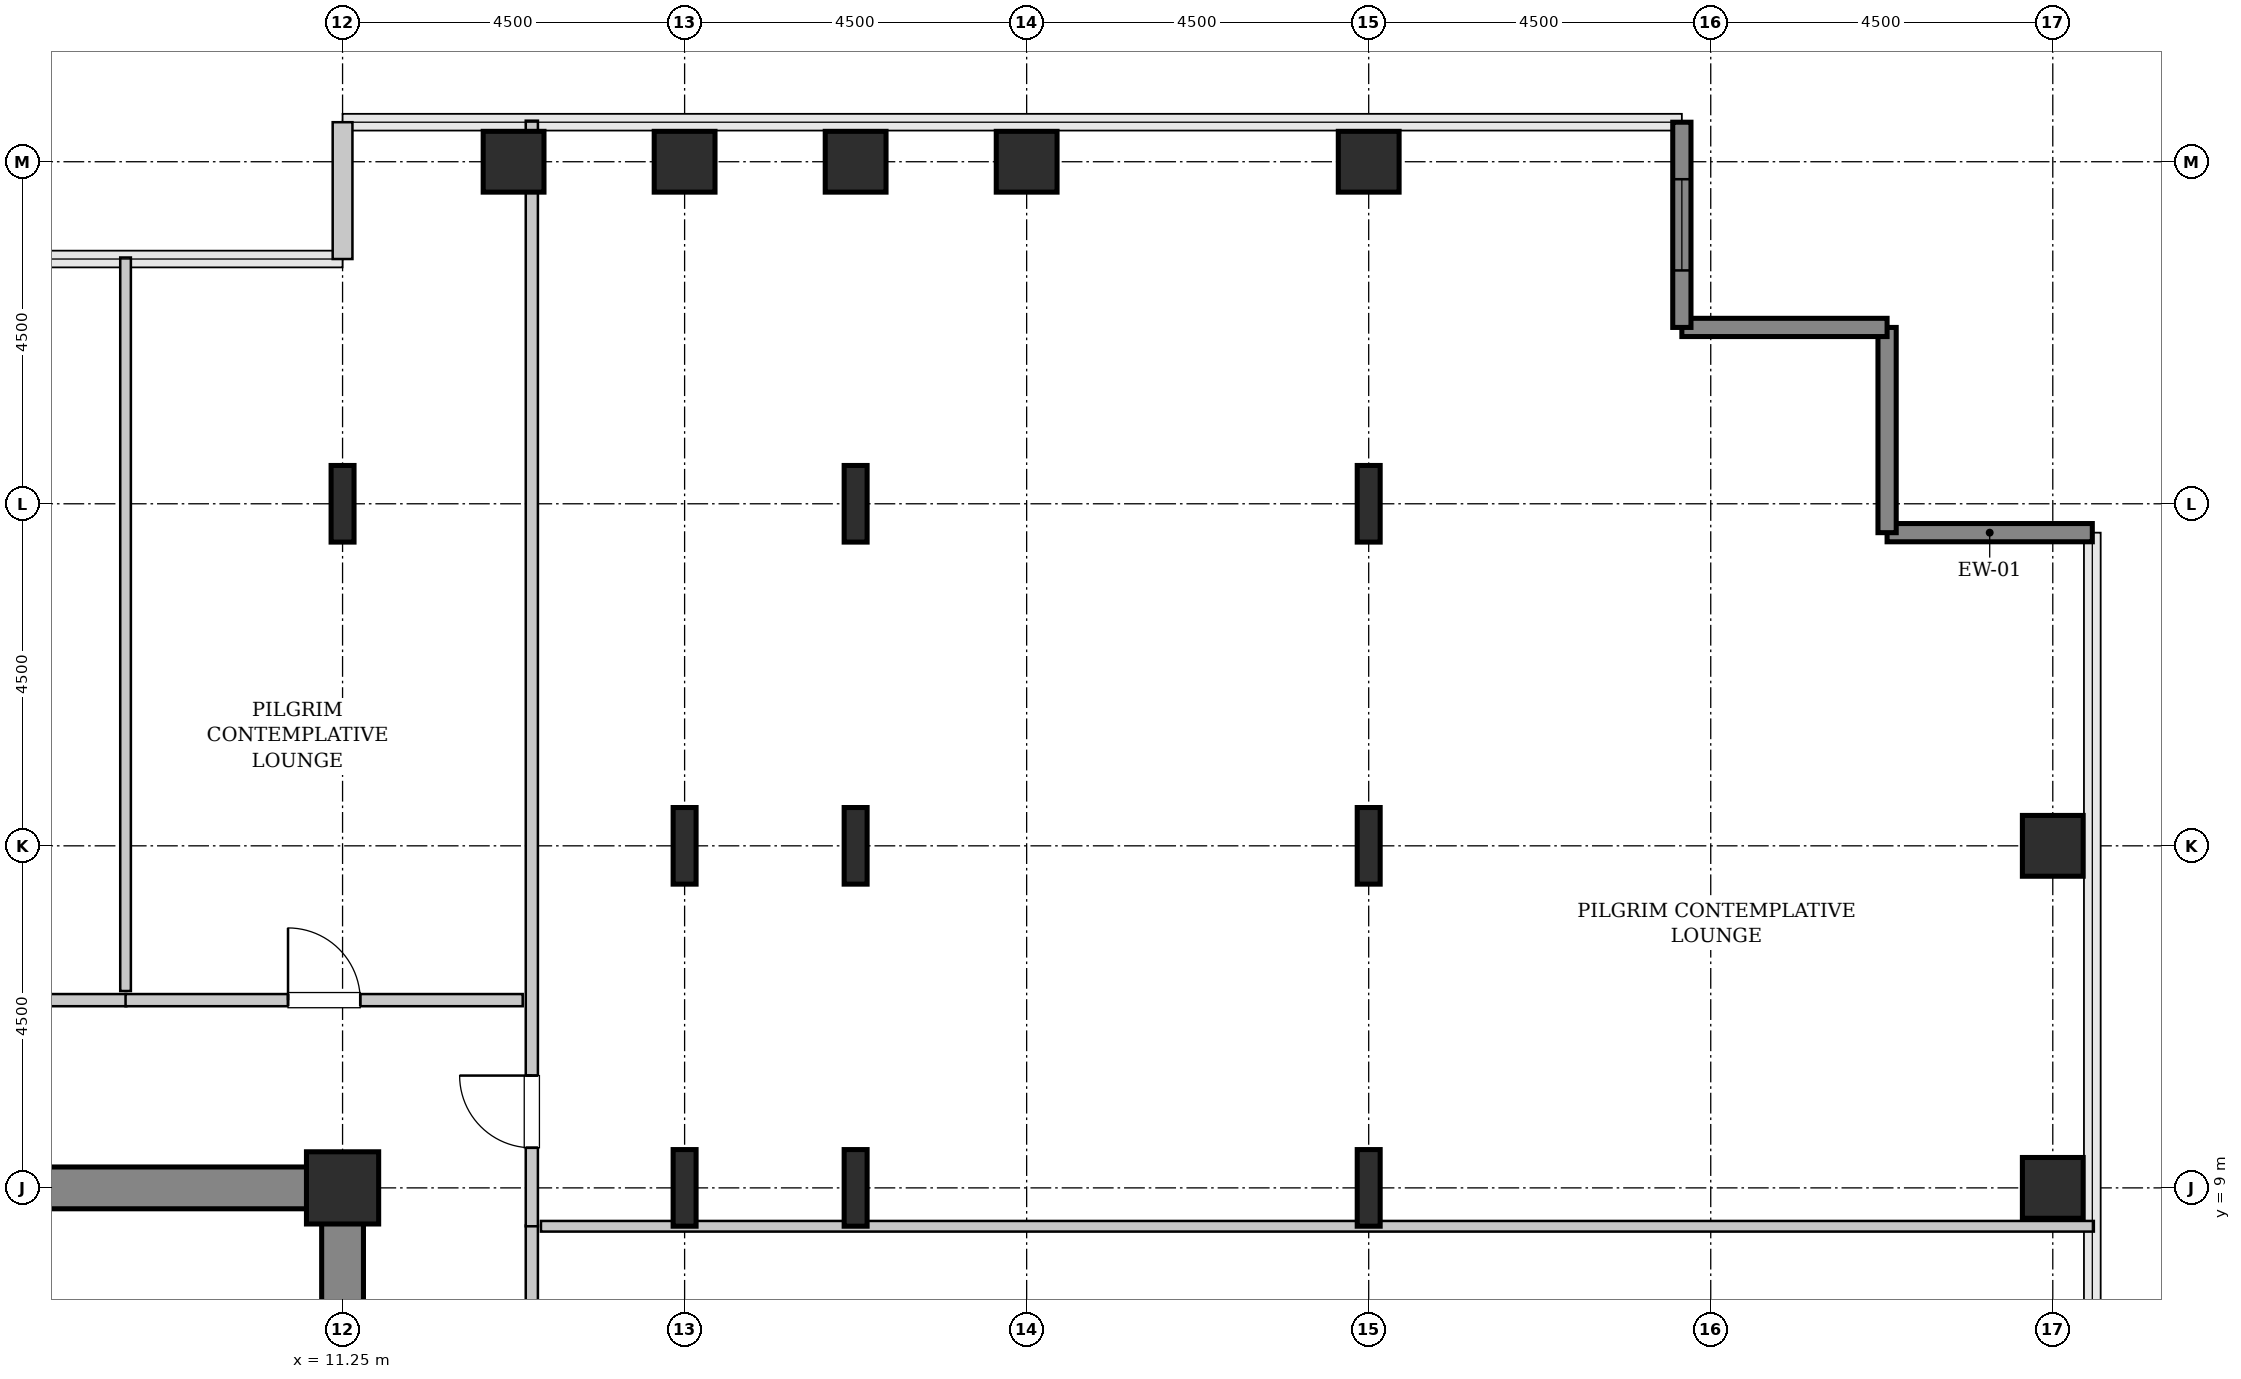
"""IFC4 building model, lengths in metres.
Left out: names, types, materials, properties, quantities, classifications, styles, units other than length and angle.
Written with IfcOpenShell. Run it as: python <this file> out.ifc"""

import sys

from ifc_helpers import new_model, si_unit, direction, frame, frame_2d, origin, origin_2d, place, context, subcontext, project, spatial, rectangle, hollow_rectangle, i_section, extrude, source, transform, mapped, element, fill, save


model = new_model("IFC4")
c1 = context("Model", 3, precision=1e-05, world=origin(), true_north=direction((0.0, 1.0)))
c2 = subcontext(c1, "Body", "Model", "MODEL_VIEW")
j1 = project(units=[si_unit("LENGTHUNIT", "METRE"), si_unit("PLANEANGLEUNIT", "RADIAN")], contexts=[c1])
p1 = place(None, origin())
s1 = spatial("IfcSite", under=j1, at=p1, CompositionType="ELEMENT")
p2 = place(p1, origin())
s2 = spatial("IfcBuilding", under=s1, at=p2, CompositionType="ELEMENT")
p3 = place(p2, frame((0.0, 0.0, 132.6)))
s3 = spatial("IfcBuildingStorey", under=s2, at=p3, CompositionType="ELEMENT", Elevation=132.6)
m1 = source(origin(), c2, "Body", "SweptSolid", [
    extrude(rectangle(XDim=9.975, YDim=0.55, at=frame_2d((4.987, 0.0))), origin(), (0.0, 0.0, 1.0), 3.8),
])
p4 = place(p3, frame((1.55, 9.0, 0.0), z_axis=(0.0, 0.0, 1.0), x_axis=(1.0, 0.0, 0.0)))
e1 = element("IfcWall", 1, at=p4, inside=s3, PredefinedType="SHEAR", context=c2, shape_type="MappedRepresentation", body=[
    mapped(m1, transform((0.0, 0.0, 0.0), x_axis=(1.0, 0.0, 0.0), y_axis=(0.0, 1.0, 0.0), z_axis=(0.0, 0.0, 1.0), scale=1.0)),
])
m2 = source(origin(), c2, "Body", "SweptSolid", [
    extrude(rectangle(XDim=7.375, YDim=0.55, at=frame_2d((3.688, 0.0))), origin(), (0.0, 0.0, 1.0), 3.8),
])
p5 = place(p3, frame((11.25, 1.35, 0.0), z_axis=(0.0, 0.0, 1.0), x_axis=(0.0, 1.0, 0.0)))
e2 = element("IfcWall", 2, at=p5, inside=s3, PredefinedType="SHEAR", context=c2, shape_type="MappedRepresentation", body=[
    mapped(m2, transform((0.0, 0.0, 0.0), x_axis=(1.0, 0.0, 0.0), y_axis=(0.0, 1.0, 0.0), z_axis=(0.0, 0.0, 1.0), scale=1.0)),
])
m3 = source(origin(), c2, "Body", "SweptSolid", [
    extrude(hollow_rectangle(XDim=0.95, YDim=0.95, WallThickness=0.045, InnerFilletRadius=0.045, OuterFilletRadius=0.09, at=origin_2d()), origin(), (0.0, 0.0, 1.0), 3.8),
])
p6 = place(p3, frame((11.25, 9.0, 0.0), z_axis=(0.0, 0.0, 1.0), x_axis=(1.0, 0.0, 0.0)))
e3 = element("IfcColumn", 3, at=p6, inside=s3, PredefinedType="COLUMN", context=c2, shape_type="MappedRepresentation", body=[
    mapped(m3, transform((0.0, 0.0, 0.0), x_axis=(1.0, 0.0, 0.0), y_axis=(0.0, 1.0, 0.0), z_axis=(0.0, 0.0, 1.0), scale=1.0)),
])
m4 = source(origin(), c2, "Body", "SweptSolid", [
    extrude(i_section(OverallWidth=0.302, OverallDepth=1.008, WebThickness=0.021, FlangeThickness=0.04, FilletRadius=0.03, at=origin_2d()), origin(), (0.0, 0.0, 1.0), 3.8),
])
p7 = place(p3, frame((11.25, 18.0, 0.0), z_axis=(0.0, 0.0, 1.0), x_axis=(1.0, 0.0, 0.0)))
e4 = element("IfcColumn", 4, at=p7, inside=s3, PredefinedType="COLUMN", context=c2, shape_type="MappedRepresentation", body=[
    mapped(m4, transform((0.0, 0.0, 0.0), x_axis=(1.0, 0.0, 0.0), y_axis=(0.0, 1.0, 0.0), z_axis=(0.0, 0.0, 1.0), scale=1.0)),
])
m5 = source(origin(), c2, "Body", "SweptSolid", [
    extrude(hollow_rectangle(XDim=0.8, YDim=0.8, WallThickness=0.04, InnerFilletRadius=0.04, OuterFilletRadius=0.08, at=origin_2d()), origin(), (0.0, 0.0, 1.0), 3.8),
])
p8 = place(p3, frame((13.5, 22.5, 0.0), z_axis=(0.0, 0.0, 1.0), x_axis=(1.0, 0.0, 0.0)))
e5 = element("IfcColumn", 5, at=p8, inside=s3, PredefinedType="COLUMN", context=c2, shape_type="MappedRepresentation", body=[
    mapped(m5, transform((0.0, 0.0, 0.0), x_axis=(1.0, 0.0, 0.0), y_axis=(0.0, 1.0, 0.0), z_axis=(0.0, 0.0, 1.0), scale=1.0)),
])
for number, where, z_axis, x_axis in (
    (6, (15.75, 9.0, 0.0), (0.0, 0.0, 1.0), (1.0, 0.0, 0.0)),
    (7, (15.75, 13.5, 0.0), (0.0, 0.0, 1.0), (1.0, 0.0, 0.0)),
):
    element("IfcColumn", number, at=place(p3, frame(where, z_axis=z_axis, x_axis=x_axis)), inside=s3, PredefinedType="COLUMN", context=c2, shape_type="MappedRepresentation", body=[
        mapped(m4, transform((0.0, 0.0, 0.0), x_axis=(1.0, 0.0, 0.0), y_axis=(0.0, 1.0, 0.0), z_axis=(0.0, 0.0, 1.0), scale=1.0)),
    ])
p9 = place(p3, frame((15.75, 22.5, 0.0), z_axis=(0.0, 0.0, 1.0), x_axis=(1.0, 0.0, 0.0)))
e8 = element("IfcColumn", 8, at=p9, inside=s3, PredefinedType="COLUMN", context=c2, shape_type="MappedRepresentation", body=[
    mapped(m5, transform((0.0, 0.0, 0.0), x_axis=(1.0, 0.0, 0.0), y_axis=(0.0, 1.0, 0.0), z_axis=(0.0, 0.0, 1.0), scale=1.0)),
])
for number, where, z_axis, x_axis in (
    (9, (18.0, 9.0, 0.0), (0.0, 0.0, 1.0), (1.0, 0.0, 0.0)),
    (10, (18.0, 13.5, 0.0), (0.0, 0.0, 1.0), (1.0, 0.0, 0.0)),
    (11, (18.0, 18.0, 0.0), (0.0, 0.0, 1.0), (1.0, 0.0, 0.0)),
):
    element("IfcColumn", number, at=place(p3, frame(where, z_axis=z_axis, x_axis=x_axis)), inside=s3, PredefinedType="COLUMN", context=c2, shape_type="MappedRepresentation", body=[
        mapped(m4, transform((0.0, 0.0, 0.0), x_axis=(1.0, 0.0, 0.0), y_axis=(0.0, 1.0, 0.0), z_axis=(0.0, 0.0, 1.0), scale=1.0)),
    ])
for number, where, z_axis, x_axis in (
    (12, (18.0, 22.5, 0.0), (0.0, 0.0, 1.0), (1.0, 0.0, 0.0)),
    (13, (20.25, 22.5, 0.0), (0.0, 0.0, 1.0), (1.0, 0.0, 0.0)),
):
    element("IfcColumn", number, at=place(p3, frame(where, z_axis=z_axis, x_axis=x_axis)), inside=s3, PredefinedType="COLUMN", context=c2, shape_type="MappedRepresentation", body=[
        mapped(m5, transform((0.0, 0.0, 0.0), x_axis=(1.0, 0.0, 0.0), y_axis=(0.0, 1.0, 0.0), z_axis=(0.0, 0.0, 1.0), scale=1.0)),
    ])
for number, where, z_axis, x_axis in (
    (14, (24.75, 9.0, 0.0), (0.0, 0.0, 1.0), (1.0, 0.0, 0.0)),
    (15, (24.75, 13.5, 0.0), (0.0, 0.0, 1.0), (1.0, 0.0, 0.0)),
    (16, (24.75, 18.0, 0.0), (0.0, 0.0, 1.0), (1.0, 0.0, 0.0)),
):
    element("IfcColumn", number, at=place(p3, frame(where, z_axis=z_axis, x_axis=x_axis)), inside=s3, PredefinedType="COLUMN", context=c2, shape_type="MappedRepresentation", body=[
        mapped(m4, transform((0.0, 0.0, 0.0), x_axis=(1.0, 0.0, 0.0), y_axis=(0.0, 1.0, 0.0), z_axis=(0.0, 0.0, 1.0), scale=1.0)),
    ])
for number, where, z_axis, x_axis in (
    (17, (24.75, 22.5, 0.0), (0.0, 0.0, 1.0), (1.0, 0.0, 0.0)),
    (18, (33.75, 9.0, 0.0), (0.0, 0.0, 1.0), (1.0, 0.0, 0.0)),
    (19, (33.75, 13.5, 0.0), (0.0, 0.0, 1.0), (1.0, 0.0, 0.0)),
):
    element("IfcColumn", number, at=place(p3, frame(where, z_axis=z_axis, x_axis=x_axis)), inside=s3, PredefinedType="COLUMN", context=c2, shape_type="MappedRepresentation", body=[
        mapped(m5, transform((0.0, 0.0, 0.0), x_axis=(1.0, 0.0, 0.0), y_axis=(0.0, 1.0, 0.0), z_axis=(0.0, 0.0, 1.0), scale=1.0)),
    ])
m6 = source(origin(), c2, "Body", "SweptSolid", [
    extrude(rectangle(XDim=2.7, YDim=0.24, at=frame_2d((1.35, 0.0))), origin(), (0.0, 0.0, 1.0), 3.55),
])
for number, where, z_axis, x_axis in (
    (20, (34.27, 17.62, 0.0), (0.0, 0.0, 1.0), (-1.0, 0.0, 0.0)),
    (21, (31.57, 17.62, 0.0), (0.0, 0.0, 1.0), (0.0, 1.0, 0.0)),
    (22, (31.57, 20.32, 0.0), (0.0, 0.0, 1.0), (-1.0, 0.0, 0.0)),
):
    element("IfcWall", number, at=place(p3, frame(where, z_axis=z_axis, x_axis=x_axis)), inside=s3, PredefinedType="SHEAR", context=c2, shape_type="MappedRepresentation", body=[
        mapped(m6, transform((0.0, 0.0, 0.0), x_axis=(1.0, 0.0, 0.0), y_axis=(0.0, 1.0, 0.0), z_axis=(0.0, 0.0, 1.0), scale=1.0)),
    ])
p10 = place(p3, frame((28.87, 20.32, 0.0), z_axis=(0.0, 0.0, 1.0), x_axis=(0.0, 1.0, 0.0)))
e23 = element("IfcWall", 23, at=p10, inside=s3, PredefinedType="SHEAR", context=c2, shape_type="MappedRepresentation", body=[
    mapped(m6, transform((0.0, 0.0, 0.0), x_axis=(1.0, 0.0, 0.0), y_axis=(0.0, 1.0, 0.0), z_axis=(0.0, 0.0, 1.0), scale=1.0)),
])
p11 = place(p10, frame((0.75, 0.0, 0.85)))
e24 = element("IfcOpeningElement", 24, at=p11, cuts=e23, PredefinedType="OPENING", context=c2, shape_type="SweptSolid", body=[
    extrude(rectangle(XDim=1.2, YDim=1.8, at=frame_2d((0.6, 0.9))), frame((0.0, 0.13, 0.0), z_axis=(0.0, -1.0, 0.0), x_axis=(1.0, 0.0, 0.0)), (0.0, 0.0, 1.0), 0.26),
])
m7 = source(origin(), c2, "Body", "SweptSolid", [
    extrude(rectangle(XDim=1.8, YDim=0.26, at=frame_2d((0.9, 0.0))), origin(), (0.0, 0.0, 1.0), 3.55),
])
p12 = place(p3, frame((11.25, 23.02, 0.0), z_axis=(0.0, 0.0, 1.0), x_axis=(0.0, -1.0, 0.0)))
e25 = element("IfcWall", 25, at=p12, inside=s3, PredefinedType="SOLIDWALL", context=c2, shape_type="MappedRepresentation", body=[
    mapped(m7, transform((0.0, 0.0, 0.0), x_axis=(1.0, 0.0, 0.0), y_axis=(0.0, 1.0, 0.0), z_axis=(0.0, 0.0, 1.0), scale=1.0)),
])
m8 = source(origin(), c2, "Body", "SweptSolid", [
    extrude(rectangle(XDim=3.11, YDim=0.16, at=frame_2d((1.555, 0.0))), origin(), (0.0, 0.0, 1.0), 3.535),
])
p13 = place(p3, frame((13.74, 5.395, 0.0), z_axis=(0.0, 0.0, 1.0), x_axis=(0.0, 1.0, 0.0)))
e26 = element("IfcWall", 26, at=p13, inside=s3, PredefinedType="PARTITIONING", context=c2, shape_type="MappedRepresentation", body=[
    mapped(m8, transform((0.0, 0.0, 0.0), x_axis=(1.0, 0.0, 0.0), y_axis=(0.0, 1.0, 0.0), z_axis=(0.0, 0.0, 1.0), scale=1.0)),
])
p14 = place(p13, frame((1.08, 0.0, 0.0)))
e27 = element("IfcOpeningElement", 27, at=p14, cuts=e26, PredefinedType="OPENING", context=c2, shape_type="SweptSolid", body=[
    extrude(rectangle(XDim=0.95, YDim=2.1, at=frame_2d((0.475, 1.05))), frame((0.0, 0.09, 0.0), z_axis=(0.0, -1.0, 0.0), x_axis=(1.0, 0.0, 0.0)), (0.0, 0.0, 1.0), 0.18),
])
m9 = source(origin(), c2, "Body", "SweptSolid", [
    extrude(rectangle(XDim=20.43, YDim=0.14, at=frame_2d((10.215, 0.0))), origin(), (0.0, 0.0, 1.0), 2.875),
])
p15 = place(p3, frame((13.86, 8.495, 0.0), z_axis=(0.0, 0.0, 1.0), x_axis=(1.0, 0.0, 0.0)))
e28 = element("IfcWall", 28, at=p15, inside=s3, PredefinedType="PARTITIONING", context=c2, shape_type="MappedRepresentation", body=[
    mapped(m9, transform((0.0, 0.0, 0.0), x_axis=(1.0, 0.0, 0.0), y_axis=(0.0, 1.0, 0.0), z_axis=(0.0, 0.0, 1.0), scale=1.0)),
])
m10 = source(origin(), c2, "Body", "SweptSolid", [
    extrude(rectangle(XDim=14.545, YDim=0.16, at=frame_2d((7.272, 0.0))), origin(), (0.0, 0.0, 1.0), 3.535),
])
p16 = place(p3, frame((13.74, 8.495, 0.0), z_axis=(0.0, 0.0, 1.0), x_axis=(0.0, 1.0, 0.0)))
e29 = element("IfcWall", 29, at=p16, inside=s3, PredefinedType="PARTITIONING", context=c2, shape_type="MappedRepresentation", body=[
    mapped(m10, transform((0.0, 0.0, 0.0), x_axis=(1.0, 0.0, 0.0), y_axis=(0.0, 1.0, 0.0), z_axis=(0.0, 0.0, 1.0), scale=1.0)),
])
p17 = place(p16, frame((1.032, 0.0, 0.0)))
e30 = element("IfcOpeningElement", 30, at=p17, cuts=e29, PredefinedType="OPENING", context=c2, shape_type="SweptSolid", body=[
    extrude(rectangle(XDim=0.95, YDim=2.1, at=frame_2d((0.475, 1.05))), frame((0.0, 0.09, 0.0), z_axis=(0.0, -1.0, 0.0), x_axis=(1.0, 0.0, 0.0)), (0.0, 0.0, 1.0), 0.18),
])
m11 = source(origin(), c2, "Body", "SweptSolid", [
    extrude(rectangle(XDim=6.21, YDim=0.16, at=frame_2d((3.105, 0.0))), origin(), (0.0, 0.0, 1.0), 3.535),
])
p18 = place(p3, frame((2.195, 11.47, 0.0), z_axis=(0.0, 0.0, 1.0), x_axis=(1.0, 0.0, 0.0)))
e31 = element("IfcWall", 31, at=p18, inside=s3, PredefinedType="PARTITIONING", context=c2, shape_type="MappedRepresentation", body=[
    mapped(m11, transform((0.0, 0.0, 0.0), x_axis=(1.0, 0.0, 0.0), y_axis=(0.0, 1.0, 0.0), z_axis=(0.0, 0.0, 1.0), scale=1.0)),
])
p19 = place(p18, frame((2.63, 0.0, 0.0)))
e32 = element("IfcOpeningElement", 32, at=p19, cuts=e31, PredefinedType="OPENING", context=c2, shape_type="SweptSolid", body=[
    extrude(rectangle(XDim=0.95, YDim=2.1, at=frame_2d((0.475, 1.05))), frame((0.0, 0.09, 0.0), z_axis=(0.0, -1.0, 0.0), x_axis=(1.0, 0.0, 0.0)), (0.0, 0.0, 1.0), 0.18),
])
m12 = source(origin(), c2, "Body", "SweptSolid", [
    extrude(rectangle(XDim=9.65, YDim=0.14, at=frame_2d((4.825, 0.0))), origin(), (0.0, 0.0, 1.0), 3.535),
])
p20 = place(p3, frame((8.395, 11.59, 0.0), z_axis=(0.0, 0.0, 1.0), x_axis=(0.0, 1.0, 0.0)))
e33 = element("IfcWall", 33, at=p20, inside=s3, PredefinedType="PARTITIONING", context=c2, shape_type="MappedRepresentation", body=[
    mapped(m12, transform((0.0, 0.0, 0.0), x_axis=(1.0, 0.0, 0.0), y_axis=(0.0, 1.0, 0.0), z_axis=(0.0, 0.0, 1.0), scale=1.0)),
])
m13 = source(origin(), c2, "Body", "SweptSolid", [
    extrude(rectangle(XDim=5.225, YDim=0.16, at=frame_2d((2.613, 0.0))), origin(), (0.0, 0.0, 1.0), 3.535),
])
p21 = place(p3, frame((8.395, 11.47, 0.0), z_axis=(0.0, 0.0, 1.0), x_axis=(1.0, 0.0, 0.0)))
e34 = element("IfcWall", 34, at=p21, inside=s3, PredefinedType="PARTITIONING", context=c2, shape_type="MappedRepresentation", body=[
    mapped(m13, transform((0.0, 0.0, 0.0), x_axis=(1.0, 0.0, 0.0), y_axis=(0.0, 1.0, 0.0), z_axis=(0.0, 0.0, 1.0), scale=1.0)),
])
p22 = place(p21, frame((2.137, 0.0, 0.0)))
e35 = element("IfcOpeningElement", 35, at=p22, cuts=e34, PredefinedType="OPENING", context=c2, shape_type="SweptSolid", body=[
    extrude(rectangle(XDim=0.95, YDim=2.1, at=frame_2d((0.475, 1.05))), frame((0.0, 0.09, 0.0), z_axis=(0.0, -1.0, 0.0), x_axis=(1.0, 0.0, 0.0)), (0.0, 0.0, 1.0), 0.18),
])
m14 = source(origin(), c2, "Body", "SweptSolid", [
    extrude(rectangle(XDim=1.2, YDim=1.8, at=frame_2d((0.6, 0.9))), frame((0.0, 0.03, 0.0), z_axis=(0.0, -1.0, 0.0), x_axis=(1.0, 0.0, 0.0)), (0.0, 0.0, 1.0), 0.06),
])
p23 = place(p11, origin())
e36 = element("IfcWindow", 36, at=p23, inside=s3, PartitioningType="SINGLE_PANEL", PredefinedType="WINDOW", context=c2, shape_type="MappedRepresentation", body=[
    mapped(m14, transform((0.0, 0.0, 0.0), x_axis=(1.0, 0.0, 0.0), y_axis=(0.0, 1.0, 0.0), z_axis=(0.0, 0.0, 1.0), scale=1.0)),
])
fill(e24, e36)
m15 = source(origin(), c2, "Body", "SweptSolid", [
    extrude(rectangle(XDim=0.95, YDim=2.1, at=frame_2d((0.475, 1.05))), frame((0.0, 0.025, 0.0), z_axis=(0.0, -1.0, 0.0), x_axis=(1.0, 0.0, 0.0)), (0.0, 0.0, 1.0), 0.05),
])
p24 = place(p17, origin())
e37 = element("IfcDoor", 37, at=p24, inside=s3, OperationType="SINGLE_SWING_RIGHT", PredefinedType="DOOR", context=c2, shape_type="MappedRepresentation", body=[
    mapped(m15, transform((0.0, 0.0, 0.0), x_axis=(1.0, 0.0, 0.0), y_axis=(0.0, 1.0, 0.0), z_axis=(0.0, 0.0, 1.0), scale=1.0)),
])
fill(e30, e37)
p25 = place(p22, origin())
e38 = element("IfcDoor", 38, at=p25, inside=s3, OperationType="SINGLE_SWING_LEFT", PredefinedType="DOOR", context=c2, shape_type="MappedRepresentation", body=[
    mapped(m15, transform((0.0, 0.0, 0.0), x_axis=(1.0, 0.0, 0.0), y_axis=(0.0, 1.0, 0.0), z_axis=(0.0, 0.0, 1.0), scale=1.0)),
])
fill(e35, e38)
save(model, sys.argv[1])
